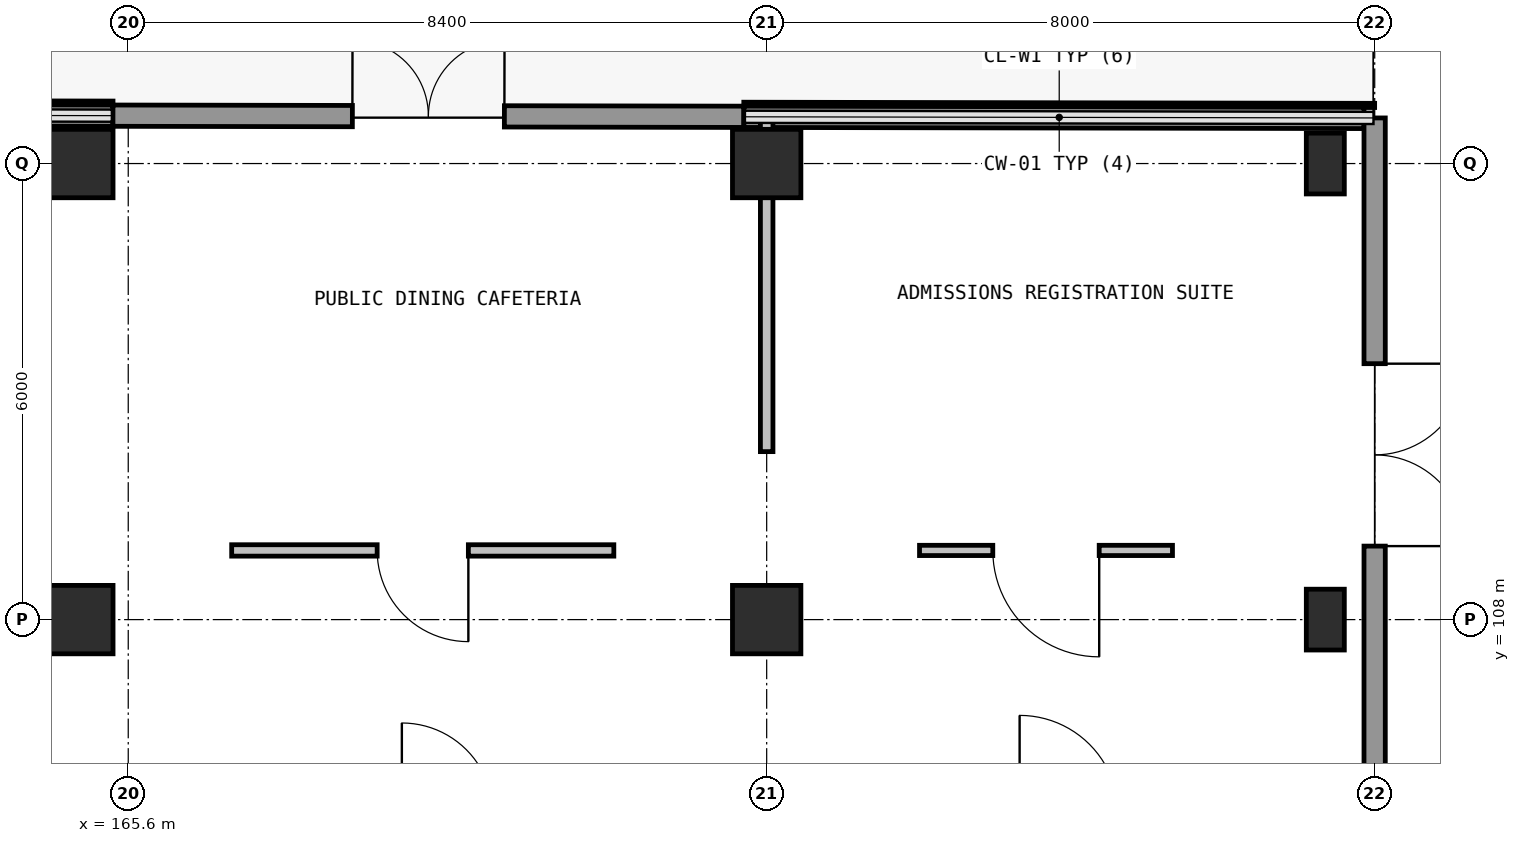
"""IFC4 building model, lengths in metres.
Left out: names, types, materials, properties, quantities, classifications, styles, units other than length and angle.
Written with IfcOpenShell. Run it as: python <this file> out.ifc"""

import sys

from ifc_helpers import new_model, si_unit, direction, frame, frame_2d, origin, origin_2d, place, context, subcontext, project, spatial, rectangle, extrude, element, fill, save


model = new_model("IFC4")
c1 = context("Model", 3, precision=1e-05, world=origin(), true_north=direction((0.0, 1.0)))
c2 = subcontext(c1, "Body", "Model", "MODEL_VIEW")
j1 = project(units=[si_unit("LENGTHUNIT", "METRE"), si_unit("PLANEANGLEUNIT", "RADIAN")], contexts=[c1])
p1 = place(None, origin())
s1 = spatial("IfcSite", under=j1, at=p1, CompositionType="ELEMENT")
p2 = place(p1, origin())
s2 = spatial("IfcBuilding", under=s1, at=p2, CompositionType="ELEMENT")
p3 = place(p2, origin())
s3 = spatial("IfcBuildingStorey", under=s2, at=p3, CompositionType="ELEMENT", Elevation=0.0)
for number, where, z_axis, x_axis in (
    (1, (164.95, 108.0, 0.0), (0.0, 0.0, 1.0), (1.0, 0.0, 0.0)),
    (2, (164.95, 114.0, 0.0), (0.0, 0.0, 1.0), (1.0, 0.0, 0.0)),
    (3, (174.0, 108.0, 0.0), (0.0, 0.0, 1.0), (1.0, 0.0, 0.0)),
    (4, (174.0, 114.0, 0.0), (0.0, 0.0, 1.0), (1.0, 0.0, 0.0)),
):
    element("IfcColumn", number, at=place(p3, frame(where, z_axis=z_axis, x_axis=x_axis)), inside=s3, PredefinedType="COLUMN", context=c2, shape_type="SweptSolid", body=[
        extrude(rectangle(XDim=0.9, YDim=0.9, at=origin_2d()), origin(), (0.0, 0.0, 1.0), 5.4),
    ])
for number, where, z_axis, x_axis in (
    (5, (181.35, 108.0, 0.0), (0.0, 0.0, 1.0), (1.0, 0.0, 0.0)),
    (6, (181.35, 114.0, 0.0), (0.0, 0.0, 1.0), (1.0, 0.0, 0.0)),
):
    element("IfcColumn", number, at=place(p3, frame(where, z_axis=z_axis, x_axis=x_axis)), inside=s3, PredefinedType="COLUMN", context=c2, shape_type="SweptSolid", body=[
        extrude(rectangle(XDim=0.5, YDim=0.8, at=origin_2d()), origin(), (0.0, 0.0, 1.0), 5.4),
    ])
p4 = place(p3, frame((157.102, 114.645, 0.0), z_axis=(0.0, 0.0, 1.0), x_axis=(0.999998335025, -0.00182481448, 0.0)))
e7 = element("IfcWall", 7, at=p4, inside=s3, PredefinedType="SOLIDWALL", context=c2, shape_type="SweptSolid", body=[
    extrude(rectangle(XDim=8.295, YDim=0.28, at=frame_2d((4.147, 0.0))), origin(), (0.0, 0.0, 1.0), 0.94),
])
p5 = place(p3, frame((165.399, 114.63, 0.0), z_axis=(0.0, 0.0, 1.0), x_axis=(0.999998390291, -0.001794273077, 0.0)))
e8 = element("IfcWall", 8, at=p5, inside=s3, PredefinedType="SOLIDWALL", context=c2, shape_type="SweptSolid", body=[
    extrude(rectangle(XDim=8.3, YDim=0.28, at=frame_2d((4.15, 0.0))), origin(), (0.0, 0.0, 1.0), 5.08),
])
p6 = place(p5, frame((3.15, 0.0, 0.0)))
e9 = element("IfcOpeningElement", 9, at=p6, cuts=e8, PredefinedType="OPENING", context=c2, shape_type="SweptSolid", body=[
    extrude(rectangle(XDim=2.0, YDim=2.3, at=frame_2d((1.0, 1.15))), frame((0.0, 0.15, 0.0), z_axis=(0.0, -1.0, 0.0), x_axis=(1.0, 0.0, 0.0)), (0.0, 0.0, 1.0), 0.3),
])
p7 = place(p3, frame((173.701, 114.615, 0.0), z_axis=(0.0, 0.0, 1.0), x_axis=(0.999998333729, -0.001825524416, 0.0)))
e10 = element("IfcWall", 10, at=p7, inside=s3, PredefinedType="SOLIDWALL", context=c2, shape_type="SweptSolid", body=[
    extrude(rectangle(XDim=8.158, YDim=0.28, at=frame_2d((4.079, 0.0))), origin(), (0.0, 0.0, 1.0), 0.94),
])
p8 = place(p3, frame((181.999, 114.6, 0.0), z_axis=(0.0, 0.0, 1.0), x_axis=(0.0, -1.0, 0.0)))
e11 = element("IfcWall", 11, at=p8, inside=s3, PredefinedType="SOLIDWALL", context=c2, shape_type="SweptSolid", body=[
    extrude(rectangle(XDim=8.866, YDim=0.28, at=frame_2d((4.433, 0.0))), origin(), (0.0, 0.0, 1.0), 5.08),
])
p9 = place(p8, frame((3.233, 0.0, 0.0)))
e12 = element("IfcOpeningElement", 12, at=p9, cuts=e11, PredefinedType="OPENING", context=c2, shape_type="SweptSolid", body=[
    extrude(rectangle(XDim=2.4, YDim=2.35, at=frame_2d((1.2, 1.175))), frame((0.0, 0.15, 0.0), z_axis=(0.0, -1.0, 0.0), x_axis=(1.0, 0.0, 0.0)), (0.0, 0.0, 1.0), 0.3),
])
p10 = place(p3, frame((174.0, 114.572, 0.0), z_axis=(0.0, 0.0, 1.0), x_axis=(0.0, -1.0, 0.0)))
e13 = element("IfcWall", 13, at=p10, inside=s3, PredefinedType="PARTITIONING", context=c2, shape_type="SweptSolid", body=[
    extrude(rectangle(XDim=4.362, YDim=0.165, at=frame_2d((2.181, 0.0))), origin(), (0.0, 0.0, 1.0), 4.33),
])
p11 = place(p3, frame((171.989, 108.91, 0.0), z_axis=(0.0, 0.0, 1.0), x_axis=(-1.0, 0.0, 0.0)))
e14 = element("IfcWall", 14, at=p11, inside=s3, PredefinedType="PARTITIONING", context=c2, shape_type="SweptSolid", body=[
    extrude(rectangle(XDim=5.028, YDim=0.15, at=frame_2d((2.514, 0.0))), origin(), (0.0, 0.0, 1.0), 5.08),
])
p12 = place(p11, frame((1.914, 0.0, 0.0)))
e15 = element("IfcOpeningElement", 15, at=p12, cuts=e14, PredefinedType="OPENING", context=c2, shape_type="SweptSolid", body=[
    extrude(rectangle(XDim=1.2, YDim=2.15, at=frame_2d((0.6, 1.075))), frame((0.0, 0.085, 0.0), z_axis=(0.0, -1.0, 0.0), x_axis=(1.0, 0.0, 0.0)), (0.0, 0.0, 1.0), 0.17),
])
p13 = place(p3, frame((179.339, 108.91, 0.0), z_axis=(0.0, 0.0, 1.0), x_axis=(-1.0, 0.0, 0.0)))
e16 = element("IfcWall", 16, at=p13, inside=s3, PredefinedType="PARTITIONING", context=c2, shape_type="SweptSolid", body=[
    extrude(rectangle(XDim=3.328, YDim=0.135, at=frame_2d((1.664, 0.0))), origin(), (0.0, 0.0, 1.0), 5.08),
])
p14 = place(p13, frame((0.964, 0.0, 0.0)))
e17 = element("IfcOpeningElement", 17, at=p14, cuts=e16, PredefinedType="OPENING", context=c2, shape_type="SweptSolid", body=[
    extrude(rectangle(XDim=1.4, YDim=2.15, at=frame_2d((0.7, 1.075))), frame((0.0, 0.077, 0.0), z_axis=(0.0, -1.0, 0.0), x_axis=(1.0, 0.0, 0.0)), (0.0, 0.0, 1.0), 0.155),
])
p15 = place(p6, origin())
e18 = element("IfcDoor", 18, at=p15, inside=s3, OperationType="DOUBLE_DOOR_SINGLE_SWING", PredefinedType="DOOR", context=c2, shape_type="SweptSolid", body=[
    extrude(rectangle(XDim=2.0, YDim=2.3, at=frame_2d((1.0, 1.15))), frame((0.0, 0.025, 0.0), z_axis=(0.0, -1.0, 0.0), x_axis=(1.0, 0.0, 0.0)), (0.0, 0.0, 1.0), 0.05),
])
fill(e9, e18)
p16 = place(p9, origin())
e19 = element("IfcDoor", 19, at=p16, inside=s3, OperationType="DOUBLE_DOOR_SINGLE_SWING", PredefinedType="DOOR", context=c2, shape_type="SweptSolid", body=[
    extrude(rectangle(XDim=2.4, YDim=2.35, at=frame_2d((1.2, 1.175))), frame((0.0, 0.025, 0.0), z_axis=(0.0, -1.0, 0.0), x_axis=(1.0, 0.0, 0.0)), (0.0, 0.0, 1.0), 0.05),
])
fill(e12, e19)
p17 = place(p12, origin())
e20 = element("IfcDoor", 20, at=p17, inside=s3, OperationType="SINGLE_SWING_LEFT", PredefinedType="DOOR", context=c2, shape_type="SweptSolid", body=[
    extrude(rectangle(XDim=1.2, YDim=2.15, at=frame_2d((0.6, 1.075))), frame((0.0, 0.025, 0.0), z_axis=(0.0, -1.0, 0.0), x_axis=(1.0, 0.0, 0.0)), (0.0, 0.0, 1.0), 0.05),
])
fill(e15, e20)
p18 = place(p14, origin())
e21 = element("IfcDoor", 21, at=p18, inside=s3, OperationType="SINGLE_SWING_RIGHT", PredefinedType="DOOR", context=c2, shape_type="SweptSolid", body=[
    extrude(rectangle(XDim=1.4, YDim=2.15, at=frame_2d((0.7, 1.075))), frame((0.0, 0.025, 0.0), z_axis=(0.0, -1.0, 0.0), x_axis=(1.0, 0.0, 0.0)), (0.0, 0.0, 1.0), 0.05),
])
fill(e17, e21)
save(model, sys.argv[1])
